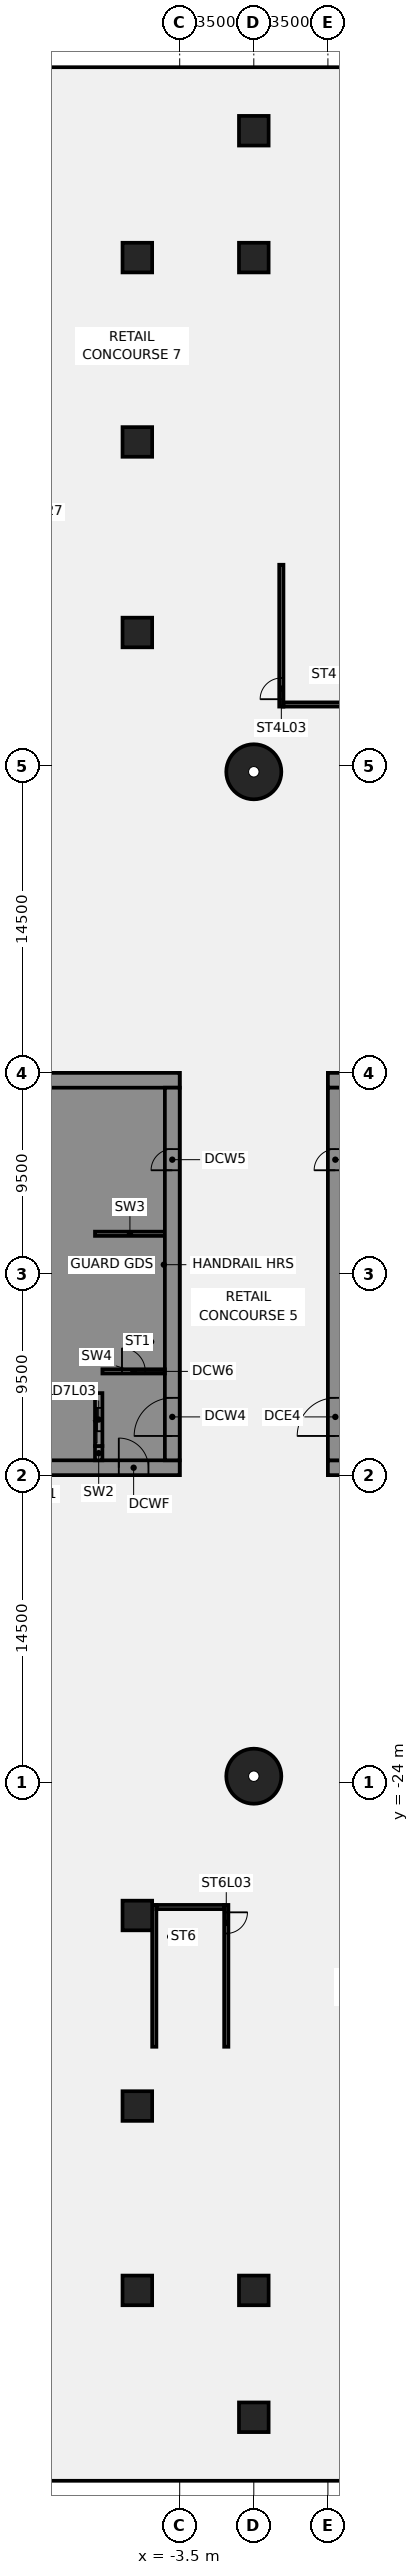
"""IFC4 building model, lengths in metres.
Left out: names, types, materials, properties, quantities, classifications, styles, units other than length and angle.
Written with IfcOpenShell. Run it as: python <this file> out.ifc"""

import sys

from ifc_helpers import new_model, si_unit, direction, frame, frame_2d, origin, origin_2d, place, context, subcontext, project, spatial, polyline, rectangle, circle, outline, extrude, element, fill, save


model = new_model("IFC4")
c1 = context("Model", 3, precision=1e-05, world=origin(), true_north=direction((0.0, 1.0)))
c2 = subcontext(c1, "Body", "Model", "MODEL_VIEW")
j1 = project(units=[si_unit("LENGTHUNIT", "METRE"), si_unit("PLANEANGLEUNIT", "RADIAN")], contexts=[c1])
p1 = place(None, origin())
s1 = spatial("IfcSite", under=j1, at=p1, CompositionType="ELEMENT")
p2 = place(p1, origin())
s2 = spatial("IfcBuilding", under=s1, at=p2, CompositionType="ELEMENT")
p3 = place(p2, frame((0.0, 0.0, 20.0)))
s3 = spatial("IfcBuildingStorey", under=s2, at=p3, CompositionType="ELEMENT", Elevation=20.0)
for number, where, z_axis, x_axis in (
    (1, (0.0, 23.721, -0.5), (0.0, 0.0, 1.0), (1.0, 0.0, 0.0)),
    (2, (0.0, -23.721, -0.5), (0.0, 0.0, 1.0), (1.0, 0.0, 0.0)),
):
    element("IfcColumn", number, at=place(p3, frame(where, z_axis=z_axis, x_axis=x_axis)), inside=s3, PredefinedType="COLUMN", context=c2, shape_type="SweptSolid", body=[
        extrude(circle(Radius=1.3, at=origin_2d()), origin(), (0.0, 0.0, 1.0), 5.05),
    ])
for number, where, z_axis, x_axis in (
    (3, (-5.5, 39.3, -0.5), (0.0, 0.0, 1.0), (1.0, 0.0, 0.0)),
    (4, (-5.5, 30.3, -0.5), (0.0, 0.0, 1.0), (1.0, 0.0, 0.0)),
    (5, (0.0, 48.008, -0.5), (0.0, 0.0, 1.0), (1.0, 0.0, 0.0)),
    (6, (-5.5, 48.008, -0.5), (0.0, 0.0, 1.0), (1.0, 0.0, 0.0)),
    (7, (-5.5, -39.3, -0.5), (0.0, 0.0, 1.0), (1.0, 0.0, 0.0)),
    (8, (-5.5, -30.3, -0.5), (0.0, 0.0, 1.0), (1.0, 0.0, 0.0)),
    (9, (-5.5, -48.008, -0.5), (0.0, 0.0, 1.0), (1.0, 0.0, 0.0)),
    (10, (0.0, -48.008, -0.5), (0.0, 0.0, 1.0), (1.0, 0.0, 0.0)),
    (11, (0.0, -54.0, -0.5), (0.0, 0.0, 1.0), (1.0, 0.0, 0.0)),
    (12, (0.0, 54.0, -0.5), (0.0, 0.0, 1.0), (1.0, 0.0, 0.0)),
):
    element("IfcColumn", number, at=place(p3, frame(where, z_axis=z_axis, x_axis=x_axis)), inside=s3, PredefinedType="COLUMN", context=c2, shape_type="SweptSolid", body=[
        extrude(rectangle(XDim=1.4, YDim=1.4, at=origin_2d()), origin(), (0.0, 0.0, 1.0), 5.05),
    ])
p4 = place(p3, frame((-16.5, -9.15, 0.0), z_axis=(0.0, 0.0, 1.0), x_axis=(1.0, 0.0, 0.0)))
e13 = element("IfcWall", 13, at=p4, inside=s3, PredefinedType="SHEAR", context=c2, shape_type="SweptSolid", body=[
    extrude(rectangle(XDim=13.0, YDim=0.7, at=frame_2d((6.5, 0.0))), origin(), (0.0, 0.0, 1.0), 4.55),
])
p5 = place(p4, frame((4.15, 0.0, 0.0)))
e14 = element("IfcOpeningElement", 14, at=p5, cuts=e13, PredefinedType="OPENING", context=c2, shape_type="SweptSolid", body=[
    extrude(rectangle(XDim=1.4, YDim=2.1, at=frame_2d((0.7, 1.05))), frame((0.0, 0.36, 0.0), z_axis=(0.0, -1.0, 0.0), x_axis=(1.0, 0.0, 0.0)), (0.0, 0.0, 1.0), 0.72),
])
p6 = place(p4, frame((10.125, 0.0, 0.0)))
e15 = element("IfcOpeningElement", 15, at=p6, cuts=e13, PredefinedType="OPENING", context=c2, shape_type="SweptSolid", body=[
    extrude(rectangle(XDim=1.4, YDim=2.1, at=frame_2d((0.7, 1.05))), frame((0.0, 0.36, 0.0), z_axis=(0.0, -1.0, 0.0), x_axis=(1.0, 0.0, 0.0)), (0.0, 0.0, 1.0), 0.72),
])
p7 = place(p3, frame((-16.5, 9.15, 0.0), z_axis=(0.0, 0.0, 1.0), x_axis=(1.0, 0.0, 0.0)))
e16 = element("IfcWall", 16, at=p7, inside=s3, PredefinedType="SHEAR", context=c2, shape_type="SweptSolid", body=[
    extrude(rectangle(XDim=13.0, YDim=0.7, at=frame_2d((6.5, 0.0))), origin(), (0.0, 0.0, 1.0), 4.55),
])
p8 = place(p3, origin())
e17 = element("IfcWall", 17, at=p8, inside=s3, PredefinedType="SHEAR", context=c2, shape_type="SweptSolid", body=[
    extrude(outline(polyline([(-9.8, -5.375), (-9.8, -5.625), (-7.5, -5.625), (-7.15, -5.625), (-7.15, 8.8), (-7.5, 8.8), (-9.8, 8.8), (-9.8, 8.125), (-7.5, 8.125), (-7.5, 5.625), (-9.8, 5.625), (-9.8, 5.375), (-7.5, 5.375), (-7.5, 2.875), (-9.8, 2.875), (-9.8, 2.625), (-7.5, 2.625), (-7.5, 0.125), (-9.8, 0.125), (-9.8, -0.125), (-7.5, -0.125), (-7.5, -2.625), (-9.8, -2.625), (-9.8, -2.875), (-7.5, -2.875), (-7.5, -5.375), (-9.8, -5.375)])), origin(), (0.0, 0.0, 1.0), 4.55),
])
p9 = place(p3, origin())
e18 = element("IfcWall", 18, at=p9, inside=s3, PredefinedType="SHEAR", context=c2, shape_type="SweptSolid", body=[
    extrude(outline(polyline([(-7.5, -8.125), (-9.55, -8.125), (-9.55, -5.625), (-9.8, -5.625), (-9.8, -8.125), (-9.8, -8.8), (-7.5, -8.8), (-7.5, -8.125)])), origin(), (0.0, 0.0, 1.0), 4.55),
])
p10 = place(p3, frame((-7.325, -8.8, 0.0), z_axis=(0.0, 0.0, 1.0), x_axis=(0.0, 1.0, 0.0)))
e19 = element("IfcWall", 19, at=p10, inside=s3, PredefinedType="SHEAR", context=c2, shape_type="SweptSolid", body=[
    extrude(rectangle(XDim=0.675, YDim=0.35, at=frame_2d((0.337, 0.0))), origin(), (0.0, 0.0, 1.0), 4.55),
])
p11 = place(p3, frame((-7.5, 1.9, 0.0), z_axis=(0.0, 0.0, 1.0), x_axis=(1.0, 0.0, 0.0)))
e20 = element("IfcWall", 20, at=p11, inside=s3, PredefinedType="SHEAR", context=c2, shape_type="SweptSolid", body=[
    extrude(rectangle(XDim=3.3, YDim=0.2, at=frame_2d((1.65, 0.0))), origin(), (0.0, 0.0, 1.0), 4.55),
])
p12 = place(p3, frame((-7.325, -8.125, 0.0), z_axis=(0.0, 0.0, 1.0), x_axis=(0.0, 1.0, 0.0)))
e21 = element("IfcWall", 21, at=p12, inside=s3, PredefinedType="SHEAR", context=c2, shape_type="SweptSolid", body=[
    extrude(rectangle(XDim=2.5, YDim=0.35, at=frame_2d((1.25, 0.0))), origin(), (0.0, 0.0, 1.0), 4.55),
])
p13 = place(p12, frame((0.7, 0.0, 0.0)))
e22 = element("IfcOpeningElement", 22, at=p13, cuts=e21, PredefinedType="OPENING", context=c2, shape_type="SweptSolid", body=[
    extrude(rectangle(XDim=1.1, YDim=2.1, at=frame_2d((0.55, 1.05))), frame((0.0, 0.185, 0.0), z_axis=(0.0, -1.0, 0.0), x_axis=(1.0, 0.0, 0.0)), (0.0, 0.0, 1.0), 0.37),
])
p14 = place(p3, frame((-3.85, -8.8, 0.0), z_axis=(0.0, 0.0, 1.0), x_axis=(0.0, 1.0, 0.0)))
e23 = element("IfcWall", 23, at=p14, inside=s3, PredefinedType="SHEAR", context=c2, shape_type="SweptSolid", body=[
    extrude(rectangle(XDim=17.6, YDim=0.7, at=frame_2d((8.8, 0.0))), origin(), (0.0, 0.0, 1.0), 4.55),
])
p15 = place(p14, frame((1.15, 0.0, 0.0)))
e24 = element("IfcOpeningElement", 24, at=p15, cuts=e23, PredefinedType="OPENING", context=c2, shape_type="SweptSolid", body=[
    extrude(rectangle(XDim=1.8, YDim=2.1, at=frame_2d((0.9, 1.05))), frame((0.0, 0.36, 0.0), z_axis=(0.0, -1.0, 0.0), x_axis=(1.0, 0.0, 0.0)), (0.0, 0.0, 1.0), 0.72),
])
p16 = place(p14, frame((13.7, 0.0, 0.0)))
e25 = element("IfcOpeningElement", 25, at=p16, cuts=e23, PredefinedType="OPENING", context=c2, shape_type="SweptSolid", body=[
    extrude(rectangle(XDim=1.0, YDim=2.1, at=frame_2d((0.5, 1.05))), frame((0.0, 0.36, 0.0), z_axis=(0.0, -1.0, 0.0), x_axis=(1.0, 0.0, 0.0)), (0.0, 0.0, 1.0), 0.72),
])
p17 = place(p3, frame((-7.15, -4.6, 0.0), z_axis=(0.0, 0.0, 1.0), x_axis=(1.0, 0.0, 0.0)))
e26 = element("IfcWall", 26, at=p17, inside=s3, PredefinedType="SHEAR", context=c2, shape_type="SweptSolid", body=[
    extrude(rectangle(XDim=2.95, YDim=0.2, at=frame_2d((1.475, 0.0))), origin(), (0.0, 0.0, 1.0), 4.55),
])
p18 = place(p17, frame((0.925, 0.0, 0.0)))
e27 = element("IfcOpeningElement", 27, at=p18, cuts=e26, PredefinedType="OPENING", context=c2, shape_type="SweptSolid", body=[
    extrude(rectangle(XDim=1.1, YDim=2.1, at=frame_2d((0.55, 1.05))), frame((0.0, 0.11, 0.0), z_axis=(0.0, -1.0, 0.0), x_axis=(1.0, 0.0, 0.0)), (0.0, 0.0, 1.0), 0.22),
])
p19 = place(p3, frame((16.5, -9.15, 0.0), z_axis=(0.0, 0.0, 1.0), x_axis=(-1.0, 0.0, 0.0)))
e28 = element("IfcWall", 28, at=p19, inside=s3, PredefinedType="SHEAR", context=c2, shape_type="SweptSolid", body=[
    extrude(rectangle(XDim=13.0, YDim=0.7, at=frame_2d((6.5, 0.0))), origin(), (0.0, 0.0, 1.0), 4.55),
])
p20 = place(p19, frame((4.15, 0.0, 0.0)))
e29 = element("IfcOpeningElement", 29, at=p20, cuts=e28, PredefinedType="OPENING", context=c2, shape_type="SweptSolid", body=[
    extrude(rectangle(XDim=1.4, YDim=2.1, at=frame_2d((0.7, 1.05))), frame((0.0, 0.36, 0.0), z_axis=(0.0, -1.0, 0.0), x_axis=(1.0, 0.0, 0.0)), (0.0, 0.0, 1.0), 0.72),
])
p21 = place(p19, frame((10.125, 0.0, 0.0)))
e30 = element("IfcOpeningElement", 30, at=p21, cuts=e28, PredefinedType="OPENING", context=c2, shape_type="SweptSolid", body=[
    extrude(rectangle(XDim=1.4, YDim=2.1, at=frame_2d((0.7, 1.05))), frame((0.0, 0.36, 0.0), z_axis=(0.0, -1.0, 0.0), x_axis=(1.0, 0.0, 0.0)), (0.0, 0.0, 1.0), 0.72),
])
p22 = place(p3, frame((16.5, 9.15, 0.0), z_axis=(0.0, 0.0, 1.0), x_axis=(-1.0, 0.0, 0.0)))
e31 = element("IfcWall", 31, at=p22, inside=s3, PredefinedType="SHEAR", context=c2, shape_type="SweptSolid", body=[
    extrude(rectangle(XDim=13.0, YDim=0.7, at=frame_2d((6.5, 0.0))), origin(), (0.0, 0.0, 1.0), 4.55),
])
p23 = place(p3, frame((3.85, -8.8, 0.0), z_axis=(0.0, 0.0, 1.0), x_axis=(0.0, 1.0, 0.0)))
e32 = element("IfcWall", 32, at=p23, inside=s3, PredefinedType="SHEAR", context=c2, shape_type="SweptSolid", body=[
    extrude(rectangle(XDim=17.6, YDim=0.7, at=frame_2d((8.8, 0.0))), origin(), (0.0, 0.0, 1.0), 4.55),
])
p24 = place(p23, frame((1.15, 0.0, 0.0)))
e33 = element("IfcOpeningElement", 33, at=p24, cuts=e32, PredefinedType="OPENING", context=c2, shape_type="SweptSolid", body=[
    extrude(rectangle(XDim=1.8, YDim=2.1, at=frame_2d((0.9, 1.05))), frame((0.0, 0.36, 0.0), z_axis=(0.0, -1.0, 0.0), x_axis=(1.0, 0.0, 0.0)), (0.0, 0.0, 1.0), 0.72),
])
p25 = place(p23, frame((13.7, 0.0, 0.0)))
e34 = element("IfcOpeningElement", 34, at=p25, cuts=e32, PredefinedType="OPENING", context=c2, shape_type="SweptSolid", body=[
    extrude(rectangle(XDim=1.0, YDim=2.1, at=frame_2d((0.5, 1.05))), frame((0.0, 0.36, 0.0), z_axis=(0.0, -1.0, 0.0), x_axis=(1.0, 0.0, 0.0)), (0.0, 0.0, 1.0), 0.72),
])
p26 = place(p3, frame((1.3, 26.8, 0.0), z_axis=(0.0, 0.0, 1.0), x_axis=(0.0, 1.0, 0.0)))
e35 = element("IfcWall", 35, at=p26, inside=s3, PredefinedType="SHEAR", context=c2, shape_type="SweptSolid", body=[
    extrude(rectangle(XDim=6.7, YDim=0.2, at=frame_2d((3.35, 0.0))), origin(), (0.0, 0.0, 1.0), 4.55),
])
p27 = place(p26, frame((0.35, 0.0, 0.0)))
e36 = element("IfcOpeningElement", 36, at=p27, cuts=e35, PredefinedType="OPENING", context=c2, shape_type="SweptSolid", body=[
    extrude(rectangle(XDim=1.0, YDim=2.1, at=frame_2d((0.5, 1.05))), frame((0.0, 0.11, 0.0), z_axis=(0.0, -1.0, 0.0), x_axis=(1.0, 0.0, 0.0)), (0.0, 0.0, 1.0), 0.22),
])
p28 = place(p3, frame((4.6, 26.9, 0.0), z_axis=(0.0, 0.0, 1.0), x_axis=(-1.0, 0.0, 0.0)))
e37 = element("IfcWall", 37, at=p28, inside=s3, PredefinedType="SHEAR", context=c2, shape_type="SweptSolid", body=[
    extrude(rectangle(XDim=3.2, YDim=0.2, at=frame_2d((1.6, 0.0))), origin(), (0.0, 0.0, 1.0), 4.55),
])
p29 = place(p3, origin())
e38 = element("IfcWall", 38, at=p29, inside=s3, PredefinedType="SHEAR", context=c2, shape_type="SweptSolid", body=[
    extrude(outline(polyline([(4.6, 33.3), (4.6, 33.5), (1.4, 33.5), (1.4, 33.3), (4.6, 33.3)])), origin(), (0.0, 0.0, 1.0), 4.55),
])
p30 = place(p3, frame((-1.3, -29.8, 0.0), z_axis=(0.0, 0.0, 1.0), x_axis=(0.0, -1.0, 0.0)))
e39 = element("IfcWall", 39, at=p30, inside=s3, PredefinedType="SHEAR", context=c2, shape_type="SweptSolid", body=[
    extrude(rectangle(XDim=6.7, YDim=0.2, at=frame_2d((3.35, 0.0))), origin(), (0.0, 0.0, 1.0), 4.55),
])
p31 = place(p30, frame((0.35, 0.0, 0.0)))
e40 = element("IfcOpeningElement", 40, at=p31, cuts=e39, PredefinedType="OPENING", context=c2, shape_type="SweptSolid", body=[
    extrude(rectangle(XDim=1.0, YDim=2.1, at=frame_2d((0.5, 1.05))), frame((0.0, 0.11, 0.0), z_axis=(0.0, -1.0, 0.0), x_axis=(1.0, 0.0, 0.0)), (0.0, 0.0, 1.0), 0.22),
])
p32 = place(p3, frame((-4.7, -29.8, 0.0), z_axis=(0.0, 0.0, 1.0), x_axis=(0.0, -1.0, 0.0)))
e41 = element("IfcWall", 41, at=p32, inside=s3, PredefinedType="SHEAR", context=c2, shape_type="SweptSolid", body=[
    extrude(rectangle(XDim=6.7, YDim=0.2, at=frame_2d((3.35, 0.0))), origin(), (0.0, 0.0, 1.0), 4.55),
])
p33 = place(p3, frame((-4.6, -29.9, 0.0), z_axis=(0.0, 0.0, 1.0), x_axis=(1.0, 0.0, 0.0)))
e42 = element("IfcWall", 42, at=p33, inside=s3, PredefinedType="SHEAR", context=c2, shape_type="SweptSolid", body=[
    extrude(rectangle(XDim=3.2, YDim=0.2, at=frame_2d((1.6, 0.0))), origin(), (0.0, 0.0, 1.0), 4.55),
])
p34 = place(p3, origin())
e43 = element("IfcWall", 43, at=p34, inside=s3, PredefinedType="SHEAR", context=c2, shape_type="SweptSolid", body=[
    extrude(outline(polyline([(-4.6, -36.3), (-4.6, -36.5), (-1.4, -36.5), (-1.4, -36.3), (-4.6, -36.3)])), origin(), (0.0, 0.0, 1.0), 4.55),
])
p35 = place(p6, origin())
e44 = element("IfcDoor", 44, at=p35, inside=s3, OperationType="SINGLE_SWING_LEFT", PredefinedType="DOOR", context=c2, shape_type="SweptSolid", body=[
    extrude(rectangle(XDim=1.4, YDim=2.1, at=frame_2d((0.7, 1.05))), frame((0.0, 0.025, 0.0), z_axis=(0.0, -1.0, 0.0), x_axis=(1.0, 0.0, 0.0)), (0.0, 0.0, 1.0), 0.05),
])
fill(e15, e44)
p36 = place(p15, origin())
e45 = element("IfcDoor", 45, at=p36, inside=s3, OperationType="SINGLE_SWING_LEFT", PredefinedType="DOOR", context=c2, shape_type="SweptSolid", body=[
    extrude(rectangle(XDim=1.8, YDim=2.1, at=frame_2d((0.9, 1.05))), frame((0.0, 0.025, 0.0), z_axis=(0.0, -1.0, 0.0), x_axis=(1.0, 0.0, 0.0)), (0.0, 0.0, 1.0), 0.05),
])
fill(e24, e45)
p37 = place(p16, origin())
e46 = element("IfcDoor", 46, at=p37, inside=s3, OperationType="SINGLE_SWING_LEFT", PredefinedType="DOOR", context=c2, shape_type="SweptSolid", body=[
    extrude(rectangle(XDim=1.0, YDim=2.1, at=frame_2d((0.5, 1.05))), frame((0.0, 0.025, 0.0), z_axis=(0.0, -1.0, 0.0), x_axis=(1.0, 0.0, 0.0)), (0.0, 0.0, 1.0), 0.05),
])
fill(e25, e46)
p38 = place(p18, origin())
e47 = element("IfcDoor", 47, at=p38, inside=s3, OperationType="SINGLE_SWING_LEFT", PredefinedType="DOOR", context=c2, shape_type="SweptSolid", body=[
    extrude(rectangle(XDim=1.1, YDim=2.1, at=frame_2d((0.55, 1.05))), frame((0.0, 0.025, 0.0), z_axis=(0.0, -1.0, 0.0), x_axis=(1.0, 0.0, 0.0)), (0.0, 0.0, 1.0), 0.05),
])
fill(e27, e47)
p39 = place(p13, origin())
e48 = element("IfcDoor", 48, at=p39, inside=s3, OperationType="SLIDING_TO_LEFT", PredefinedType="DOOR", context=c2, shape_type="SweptSolid", body=[
    extrude(rectangle(XDim=1.1, YDim=2.1, at=frame_2d((0.55, 1.05))), frame((0.0, 0.025, 0.0), z_axis=(0.0, -1.0, 0.0), x_axis=(1.0, 0.0, 0.0)), (0.0, 0.0, 1.0), 0.05),
])
fill(e22, e48)
p40 = place(p24, origin())
e49 = element("IfcDoor", 49, at=p40, inside=s3, OperationType="SINGLE_SWING_LEFT", PredefinedType="DOOR", context=c2, shape_type="SweptSolid", body=[
    extrude(rectangle(XDim=1.8, YDim=2.1, at=frame_2d((0.9, 1.05))), frame((0.0, 0.025, 0.0), z_axis=(0.0, -1.0, 0.0), x_axis=(1.0, 0.0, 0.0)), (0.0, 0.0, 1.0), 0.05),
])
fill(e33, e49)
p41 = place(p25, origin())
e50 = element("IfcDoor", 50, at=p41, inside=s3, OperationType="SINGLE_SWING_LEFT", PredefinedType="DOOR", context=c2, shape_type="SweptSolid", body=[
    extrude(rectangle(XDim=1.0, YDim=2.1, at=frame_2d((0.5, 1.05))), frame((0.0, 0.025, 0.0), z_axis=(0.0, -1.0, 0.0), x_axis=(1.0, 0.0, 0.0)), (0.0, 0.0, 1.0), 0.05),
])
fill(e34, e50)
p42 = place(p27, origin())
e51 = element("IfcDoor", 51, at=p42, inside=s3, OperationType="SINGLE_SWING_LEFT", PredefinedType="DOOR", context=c2, shape_type="SweptSolid", body=[
    extrude(rectangle(XDim=1.0, YDim=2.1, at=frame_2d((0.5, 1.05))), frame((0.0, 0.025, 0.0), z_axis=(0.0, -1.0, 0.0), x_axis=(1.0, 0.0, 0.0)), (0.0, 0.0, 1.0), 0.05),
])
fill(e36, e51)
p43 = place(p31, origin())
e52 = element("IfcDoor", 52, at=p43, inside=s3, OperationType="SINGLE_SWING_LEFT", PredefinedType="DOOR", context=c2, shape_type="SweptSolid", body=[
    extrude(rectangle(XDim=1.0, YDim=2.1, at=frame_2d((0.5, 1.05))), frame((0.0, 0.025, 0.0), z_axis=(0.0, -1.0, 0.0), x_axis=(1.0, 0.0, 0.0)), (0.0, 0.0, 1.0), 0.05),
])
fill(e40, e52)
save(model, sys.argv[1])
